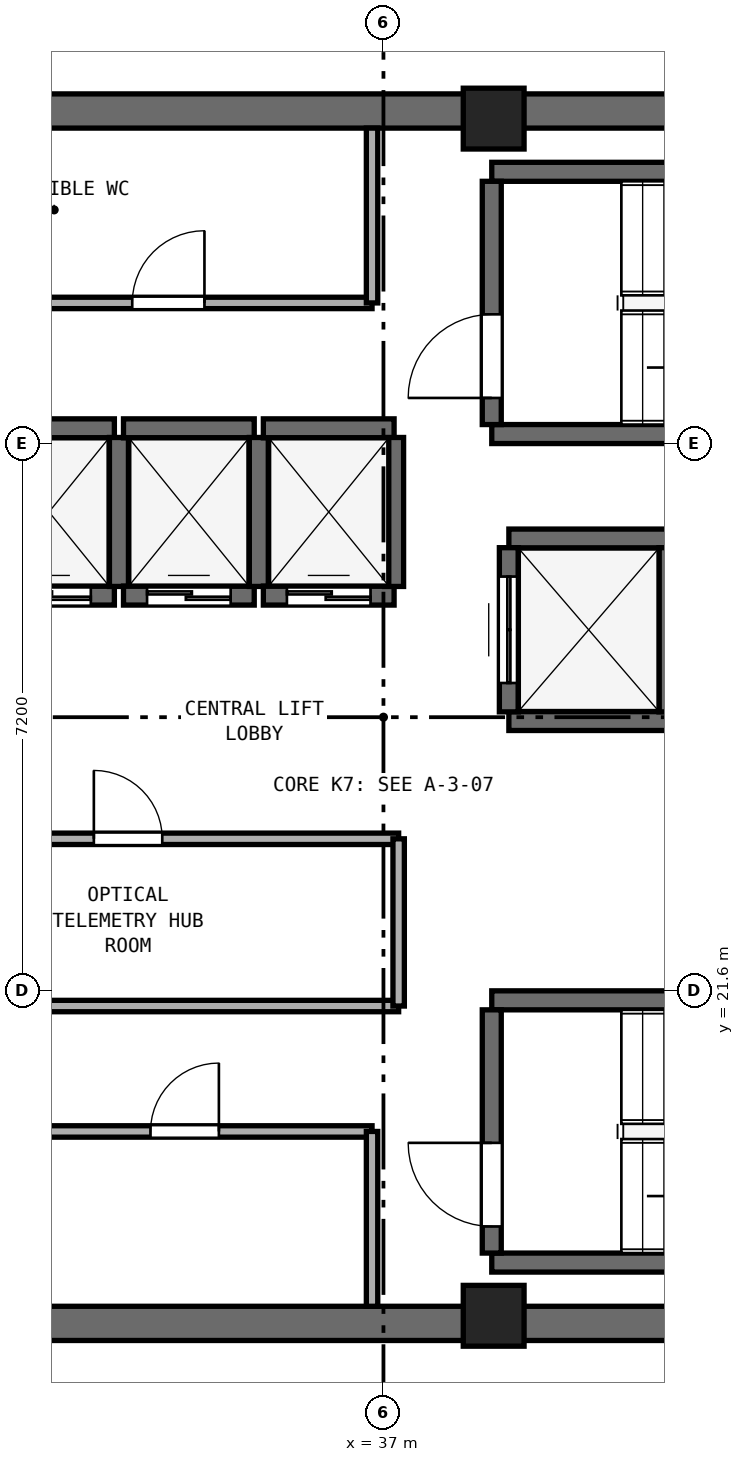
"""IFC4 building model, lengths in metres.
Left out: names, types, materials, properties, quantities, classifications, styles, units other than length and angle.
Written with IfcOpenShell. Run it as: python <this file> out.ifc"""

import sys

from ifc_helpers import new_model, si_unit, direction, frame, frame_2d, origin, origin_2d, place, context, subcontext, project, spatial, rectangle, extrude, element, fill, save


model = new_model("IFC4")
c1 = context("Model", 3, precision=1e-05, world=origin(), true_north=direction((0.0, 1.0)))
c2 = subcontext(c1, "Body", "Model", "MODEL_VIEW")
j1 = project(units=[si_unit("LENGTHUNIT", "METRE"), si_unit("PLANEANGLEUNIT", "RADIAN")], contexts=[c1])
p1 = place(None, origin())
s1 = spatial("IfcSite", under=j1, at=p1, CompositionType="ELEMENT")
p2 = place(p1, origin())
s2 = spatial("IfcBuilding", under=s1, at=p2, CompositionType="ELEMENT")
p3 = place(p2, frame((0.0, 0.0, 274.4)))
s3 = spatial("IfcBuildingStorey", under=s2, at=p3, CompositionType="ELEMENT", Elevation=274.4)
for number, where, z_axis, x_axis in (
    (1, (25.4, 17.225, 0.0), (0.0, 0.0, 1.0), (1.0, 0.0, 0.0)),
    (2, (25.4, 33.175, 0.0), (0.0, 0.0, 1.0), (1.0, 0.0, 0.0)),
):
    element("IfcWall", number, at=place(p3, frame(where, z_axis=z_axis, x_axis=x_axis)), inside=s3, PredefinedType="SHEAR", context=c2, shape_type="SweptSolid", body=[
        extrude(rectangle(XDim=23.2, YDim=0.45, at=frame_2d((11.6, 0.0))), origin(), (0.0, 0.0, 1.0), 3.54),
    ])
for number, where, z_axis, x_axis in (
    (3, (38.45, 17.325, 0.0), (0.0, 0.0, 1.0), (1.0, 0.0, 0.0)),
    (4, (38.45, 33.075, 0.0), (0.0, 0.0, 1.0), (1.0, 0.0, 0.0)),
):
    element("IfcColumn", number, at=place(p3, frame(where, z_axis=z_axis, x_axis=x_axis)), inside=s3, PredefinedType="PILASTER", context=c2, shape_type="SweptSolid", body=[
        extrude(rectangle(XDim=0.8, YDim=0.8, at=origin_2d()), origin(), (0.0, 0.0, 1.0), 3.8),
    ])
for number, where, z_axis, x_axis in (
    (5, (38.425, 28.925, 0.0), (0.0, 0.0, 1.0), (1.0, 0.0, 0.0)),
    (6, (38.425, 32.375, 0.0), (0.0, 0.0, 1.0), (1.0, 0.0, 0.0)),
):
    element("IfcWall", number, at=place(p3, frame(where, z_axis=z_axis, x_axis=x_axis)), inside=s3, PredefinedType="SHEAR", context=c2, shape_type="SweptSolid", body=[
        extrude(rectangle(XDim=7.3, YDim=0.25, at=frame_2d((3.65, 0.0))), origin(), (0.0, 0.0, 1.0), 3.54),
    ])
p4 = place(p3, frame((38.425, 29.05, 0.0), z_axis=(0.0, 0.0, 1.0), x_axis=(0.0, 1.0, 0.0)))
e7 = element("IfcWall", 7, at=p4, inside=s3, PredefinedType="SHEAR", context=c2, shape_type="SweptSolid", body=[
    extrude(rectangle(XDim=3.2, YDim=0.25, at=frame_2d((1.6, 0.0))), origin(), (0.0, 0.0, 1.0), 3.54),
])
p5 = place(p4, frame((0.35, 0.0, 0.0)))
e8 = element("IfcOpeningElement", 8, at=p5, cuts=e7, PredefinedType="OPENING", context=c2, shape_type="SweptSolid", body=[
    extrude(rectangle(XDim=1.1, YDim=2.15, at=frame_2d((0.55, 1.075))), frame((0.0, 0.135, 0.0), z_axis=(0.0, -1.0, 0.0), x_axis=(1.0, 0.0, 0.0)), (0.0, 0.0, 1.0), 0.27),
])
for number, where, z_axis, x_axis in (
    (9, (38.425, 18.025, 0.0), (0.0, 0.0, 1.0), (1.0, 0.0, 0.0)),
    (10, (38.425, 21.475, 0.0), (0.0, 0.0, 1.0), (1.0, 0.0, 0.0)),
):
    element("IfcWall", number, at=place(p3, frame(where, z_axis=z_axis, x_axis=x_axis)), inside=s3, PredefinedType="SHEAR", context=c2, shape_type="SweptSolid", body=[
        extrude(rectangle(XDim=7.3, YDim=0.25, at=frame_2d((3.65, 0.0))), origin(), (0.0, 0.0, 1.0), 3.54),
    ])
p6 = place(p3, frame((38.425, 18.15, 0.0), z_axis=(0.0, 0.0, 1.0), x_axis=(0.0, 1.0, 0.0)))
e11 = element("IfcWall", 11, at=p6, inside=s3, PredefinedType="SHEAR", context=c2, shape_type="SweptSolid", body=[
    extrude(rectangle(XDim=3.2, YDim=0.25, at=frame_2d((1.6, 0.0))), origin(), (0.0, 0.0, 1.0), 3.54),
])
p7 = place(p6, frame((0.35, 0.0, 0.0)))
e12 = element("IfcOpeningElement", 12, at=p7, cuts=e11, PredefinedType="OPENING", context=c2, shape_type="SweptSolid", body=[
    extrude(rectangle(XDim=1.1, YDim=2.15, at=frame_2d((0.55, 1.075))), frame((0.0, 0.135, 0.0), z_axis=(0.0, -1.0, 0.0), x_axis=(1.0, 0.0, 0.0)), (0.0, 0.0, 1.0), 0.27),
])
p8 = place(p3, frame((31.74, 26.8, 0.0), z_axis=(0.0, 0.0, 1.0), x_axis=(1.0, 0.0, 0.0)))
e13 = element("IfcWall", 13, at=p8, inside=s3, PredefinedType="SHEAR", context=c2, shape_type="SweptSolid", body=[
    extrude(rectangle(XDim=1.72, YDim=0.25, at=frame_2d((0.86, 0.0))), origin(), (0.0, 0.0, 1.0), 3.54),
])
p9 = place(p8, frame((0.31, 0.0, 0.0)))
e14 = element("IfcOpeningElement", 14, at=p9, cuts=e13, PredefinedType="OPENING", context=c2, shape_type="SweptSolid", body=[
    extrude(rectangle(XDim=1.1, YDim=2.15, at=frame_2d((0.55, 1.075))), frame((0.0, 0.135, 0.0), z_axis=(0.0, -1.0, 0.0), x_axis=(1.0, 0.0, 0.0)), (0.0, 0.0, 1.0), 0.27),
])
p10 = place(p3, frame((31.74, 29.0, 0.0), z_axis=(0.0, 0.0, 1.0), x_axis=(1.0, 0.0, 0.0)))
e15 = element("IfcWall", 15, at=p10, inside=s3, PredefinedType="SHEAR", context=c2, shape_type="SweptSolid", body=[
    extrude(rectangle(XDim=1.72, YDim=0.25, at=frame_2d((0.86, 0.0))), origin(), (0.0, 0.0, 1.0), 3.54),
])
p11 = place(p3, frame((33.52, 26.92, 0.0), z_axis=(0.0, 0.0, 1.0), x_axis=(0.0, 1.0, 0.0)))
e16 = element("IfcWall", 16, at=p11, inside=s3, PredefinedType="SHEAR", context=c2, shape_type="SweptSolid", body=[
    extrude(rectangle(XDim=1.96, YDim=0.25, at=frame_2d((0.98, 0.0))), origin(), (0.0, 0.0, 1.0), 3.54),
])
p12 = place(p3, frame((33.58, 26.8, 0.0), z_axis=(0.0, 0.0, 1.0), x_axis=(1.0, 0.0, 0.0)))
e17 = element("IfcWall", 17, at=p12, inside=s3, PredefinedType="SHEAR", context=c2, shape_type="SweptSolid", body=[
    extrude(rectangle(XDim=1.72, YDim=0.25, at=frame_2d((0.86, 0.0))), origin(), (0.0, 0.0, 1.0), 3.54),
])
p13 = place(p12, frame((0.31, 0.0, 0.0)))
e18 = element("IfcOpeningElement", 18, at=p13, cuts=e17, PredefinedType="OPENING", context=c2, shape_type="SweptSolid", body=[
    extrude(rectangle(XDim=1.1, YDim=2.15, at=frame_2d((0.55, 1.075))), frame((0.0, 0.135, 0.0), z_axis=(0.0, -1.0, 0.0), x_axis=(1.0, 0.0, 0.0)), (0.0, 0.0, 1.0), 0.27),
])
p14 = place(p3, frame((33.58, 29.0, 0.0), z_axis=(0.0, 0.0, 1.0), x_axis=(1.0, 0.0, 0.0)))
e19 = element("IfcWall", 19, at=p14, inside=s3, PredefinedType="SHEAR", context=c2, shape_type="SweptSolid", body=[
    extrude(rectangle(XDim=1.72, YDim=0.25, at=frame_2d((0.86, 0.0))), origin(), (0.0, 0.0, 1.0), 3.54),
])
p15 = place(p3, frame((35.36, 26.92, 0.0), z_axis=(0.0, 0.0, 1.0), x_axis=(0.0, 1.0, 0.0)))
e20 = element("IfcWall", 20, at=p15, inside=s3, PredefinedType="SHEAR", context=c2, shape_type="SweptSolid", body=[
    extrude(rectangle(XDim=1.96, YDim=0.25, at=frame_2d((0.98, 0.0))), origin(), (0.0, 0.0, 1.0), 3.54),
])
p16 = place(p3, frame((35.42, 26.8, 0.0), z_axis=(0.0, 0.0, 1.0), x_axis=(1.0, 0.0, 0.0)))
e21 = element("IfcWall", 21, at=p16, inside=s3, PredefinedType="SHEAR", context=c2, shape_type="SweptSolid", body=[
    extrude(rectangle(XDim=1.72, YDim=0.25, at=frame_2d((0.86, 0.0))), origin(), (0.0, 0.0, 1.0), 3.54),
])
p17 = place(p16, frame((0.31, 0.0, 0.0)))
e22 = element("IfcOpeningElement", 22, at=p17, cuts=e21, PredefinedType="OPENING", context=c2, shape_type="SweptSolid", body=[
    extrude(rectangle(XDim=1.1, YDim=2.15, at=frame_2d((0.55, 1.075))), frame((0.0, 0.135, 0.0), z_axis=(0.0, -1.0, 0.0), x_axis=(1.0, 0.0, 0.0)), (0.0, 0.0, 1.0), 0.27),
])
p18 = place(p3, frame((35.42, 29.0, 0.0), z_axis=(0.0, 0.0, 1.0), x_axis=(1.0, 0.0, 0.0)))
e23 = element("IfcWall", 23, at=p18, inside=s3, PredefinedType="SHEAR", context=c2, shape_type="SweptSolid", body=[
    extrude(rectangle(XDim=1.72, YDim=0.25, at=frame_2d((0.86, 0.0))), origin(), (0.0, 0.0, 1.0), 3.54),
])
p19 = place(p3, frame((37.14, 26.92, 0.0), z_axis=(0.0, 0.0, 1.0), x_axis=(0.0, 1.0, 0.0)))
e24 = element("IfcWall", 24, at=p19, inside=s3, PredefinedType="SHEAR", context=c2, shape_type="SweptSolid", body=[
    extrude(rectangle(XDim=1.96, YDim=0.25, at=frame_2d((0.98, 0.0))), origin(), (0.0, 0.0, 1.0), 3.54),
])
for number, where, z_axis, x_axis in (
    (25, (38.65, 25.15, 0.0), (0.0, 0.0, 1.0), (1.0, 0.0, 0.0)),
    (26, (38.65, 27.55, 0.0), (0.0, 0.0, 1.0), (1.0, 0.0, 0.0)),
):
    element("IfcWall", number, at=place(p3, frame(where, z_axis=z_axis, x_axis=x_axis)), inside=s3, PredefinedType="SHEAR", context=c2, shape_type="SweptSolid", body=[
        extrude(rectangle(XDim=2.1, YDim=0.25, at=frame_2d((1.05, 0.0))), origin(), (0.0, 0.0, 1.0), 3.54),
    ])
p20 = place(p3, frame((38.65, 25.27, 0.0), z_axis=(0.0, 0.0, 1.0), x_axis=(0.0, 1.0, 0.0)))
e27 = element("IfcWall", 27, at=p20, inside=s3, PredefinedType="SHEAR", context=c2, shape_type="SweptSolid", body=[
    extrude(rectangle(XDim=2.16, YDim=0.25, at=frame_2d((1.08, 0.0))), origin(), (0.0, 0.0, 1.0), 3.54),
])
p21 = place(p20, frame((0.38, 0.0, 0.0)))
e28 = element("IfcOpeningElement", 28, at=p21, cuts=e27, PredefinedType="OPENING", context=c2, shape_type="SweptSolid", body=[
    extrude(rectangle(XDim=1.4, YDim=2.2, at=frame_2d((0.7, 1.1))), frame((0.0, 0.135, 0.0), z_axis=(0.0, -1.0, 0.0), x_axis=(1.0, 0.0, 0.0)), (0.0, 0.0, 1.0), 0.27),
])
p22 = place(p3, frame((40.75, 25.27, 0.0), z_axis=(0.0, 0.0, 1.0), x_axis=(0.0, 1.0, 0.0)))
e29 = element("IfcWall", 29, at=p22, inside=s3, PredefinedType="SHEAR", context=c2, shape_type="SweptSolid", body=[
    extrude(rectangle(XDim=2.16, YDim=0.25, at=frame_2d((1.08, 0.0))), origin(), (0.0, 0.0, 1.0), 3.54),
])
p23 = place(p3, frame((31.49, 30.65, 0.0), z_axis=(0.0, 0.0, 1.0), x_axis=(1.0, 0.0, 0.0)))
e30 = element("IfcWall", 30, at=p23, inside=s3, PredefinedType="PARTITIONING", context=c2, shape_type="SweptSolid", body=[
    extrude(rectangle(XDim=5.36, YDim=0.15, at=frame_2d((2.68, 0.0))), origin(), (0.0, 0.0, 1.0), 3.54),
])
p24 = place(p23, frame((2.205, 0.0, 0.0)))
e31 = element("IfcOpeningElement", 31, at=p24, cuts=e30, PredefinedType="OPENING", context=c2, shape_type="SweptSolid", body=[
    extrude(rectangle(XDim=0.95, YDim=2.1, at=frame_2d((0.475, 1.05))), frame((0.0, 0.085, 0.0), z_axis=(0.0, -1.0, 0.0), x_axis=(1.0, 0.0, 0.0)), (0.0, 0.0, 1.0), 0.17),
])
p25 = place(p3, frame((36.85, 30.65, 0.0), z_axis=(0.0, 0.0, 1.0), x_axis=(0.0, 1.0, 0.0)))
e32 = element("IfcWall", 32, at=p25, inside=s3, PredefinedType="PARTITIONING", context=c2, shape_type="SweptSolid", body=[
    extrude(rectangle(XDim=2.3, YDim=0.15, at=frame_2d((1.15, 0.0))), origin(), (0.0, 0.0, 1.0), 3.54),
])
p26 = place(p3, frame((31.92, 19.75, 0.0), z_axis=(0.0, 0.0, 1.0), x_axis=(1.0, 0.0, 0.0)))
e33 = element("IfcWall", 33, at=p26, inside=s3, PredefinedType="PARTITIONING", context=c2, shape_type="SweptSolid", body=[
    extrude(rectangle(XDim=4.93, YDim=0.15, at=frame_2d((2.465, 0.0))), origin(), (0.0, 0.0, 1.0), 3.54),
])
p27 = place(p26, frame((2.015, 0.0, 0.0)))
e34 = element("IfcOpeningElement", 34, at=p27, cuts=e33, PredefinedType="OPENING", context=c2, shape_type="SweptSolid", body=[
    extrude(rectangle(XDim=0.9, YDim=2.1, at=frame_2d((0.45, 1.05))), frame((0.0, 0.085, 0.0), z_axis=(0.0, -1.0, 0.0), x_axis=(1.0, 0.0, 0.0)), (0.0, 0.0, 1.0), 0.17),
])
p28 = place(p3, frame((36.85, 17.45, 0.0), z_axis=(0.0, 0.0, 1.0), x_axis=(0.0, 1.0, 0.0)))
e35 = element("IfcWall", 35, at=p28, inside=s3, PredefinedType="PARTITIONING", context=c2, shape_type="SweptSolid", body=[
    extrude(rectangle(XDim=2.3, YDim=0.15, at=frame_2d((1.15, 0.0))), origin(), (0.0, 0.0, 1.0), 3.54),
])
p29 = place(p3, frame((30.08, 21.4, 0.0), z_axis=(0.0, 0.0, 1.0), x_axis=(1.0, 0.0, 0.0)))
e36 = element("IfcWall", 36, at=p29, inside=s3, PredefinedType="PARTITIONING", context=c2, shape_type="SweptSolid", body=[
    extrude(rectangle(XDim=7.12, YDim=0.15, at=frame_2d((3.56, 0.0))), origin(), (0.0, 0.0, 1.0), 3.54),
])
p30 = place(p3, frame((30.08, 23.6, 0.0), z_axis=(0.0, 0.0, 1.0), x_axis=(1.0, 0.0, 0.0)))
e37 = element("IfcWall", 37, at=p30, inside=s3, PredefinedType="PARTITIONING", context=c2, shape_type="SweptSolid", body=[
    extrude(rectangle(XDim=7.12, YDim=0.15, at=frame_2d((3.56, 0.0))), origin(), (0.0, 0.0, 1.0), 3.54),
])
p31 = place(p30, frame((3.11, 0.0, 0.0)))
e38 = element("IfcOpeningElement", 38, at=p31, cuts=e37, PredefinedType="OPENING", context=c2, shape_type="SweptSolid", body=[
    extrude(rectangle(XDim=0.9, YDim=2.1, at=frame_2d((0.45, 1.05))), frame((0.0, 0.085, 0.0), z_axis=(0.0, -1.0, 0.0), x_axis=(1.0, 0.0, 0.0)), (0.0, 0.0, 1.0), 0.17),
])
p32 = place(p3, frame((37.2, 21.4, 0.0), z_axis=(0.0, 0.0, 1.0), x_axis=(0.0, 1.0, 0.0)))
e39 = element("IfcWall", 39, at=p32, inside=s3, PredefinedType="PARTITIONING", context=c2, shape_type="SweptSolid", body=[
    extrude(rectangle(XDim=2.2, YDim=0.15, at=frame_2d((1.1, 0.0))), origin(), (0.0, 0.0, 1.0), 3.54),
])
p33 = place(p5, origin())
e40 = element("IfcDoor", 40, at=p33, inside=s3, OperationType="SINGLE_SWING_LEFT", PredefinedType="DOOR", context=c2, shape_type="SweptSolid", body=[
    extrude(rectangle(XDim=1.1, YDim=2.15, at=frame_2d((0.55, 1.075))), frame((0.0, 0.025, 0.0), z_axis=(0.0, -1.0, 0.0), x_axis=(1.0, 0.0, 0.0)), (0.0, 0.0, 1.0), 0.05),
])
fill(e8, e40)
p34 = place(p7, origin())
e41 = element("IfcDoor", 41, at=p34, inside=s3, OperationType="SINGLE_SWING_RIGHT", PredefinedType="DOOR", context=c2, shape_type="SweptSolid", body=[
    extrude(rectangle(XDim=1.1, YDim=2.15, at=frame_2d((0.55, 1.075))), frame((0.0, 0.025, 0.0), z_axis=(0.0, -1.0, 0.0), x_axis=(1.0, 0.0, 0.0)), (0.0, 0.0, 1.0), 0.05),
])
fill(e12, e41)
p35 = place(p9, origin())
e42 = element("IfcDoor", 42, at=p35, inside=s3, OperationType="DOUBLE_DOOR_SLIDING", PredefinedType="DOOR", context=c2, shape_type="SweptSolid", body=[
    extrude(rectangle(XDim=1.1, YDim=2.15, at=frame_2d((0.55, 1.075))), frame((0.0, 0.025, 0.0), z_axis=(0.0, -1.0, 0.0), x_axis=(1.0, 0.0, 0.0)), (0.0, 0.0, 1.0), 0.05),
])
fill(e14, e42)
p36 = place(p13, origin())
e43 = element("IfcDoor", 43, at=p36, inside=s3, OperationType="DOUBLE_DOOR_SLIDING", PredefinedType="DOOR", context=c2, shape_type="SweptSolid", body=[
    extrude(rectangle(XDim=1.1, YDim=2.15, at=frame_2d((0.55, 1.075))), frame((0.0, 0.025, 0.0), z_axis=(0.0, -1.0, 0.0), x_axis=(1.0, 0.0, 0.0)), (0.0, 0.0, 1.0), 0.05),
])
fill(e18, e43)
p37 = place(p17, origin())
e44 = element("IfcDoor", 44, at=p37, inside=s3, OperationType="DOUBLE_DOOR_SLIDING", PredefinedType="DOOR", context=c2, shape_type="SweptSolid", body=[
    extrude(rectangle(XDim=1.1, YDim=2.15, at=frame_2d((0.55, 1.075))), frame((0.0, 0.025, 0.0), z_axis=(0.0, -1.0, 0.0), x_axis=(1.0, 0.0, 0.0)), (0.0, 0.0, 1.0), 0.05),
])
fill(e22, e44)
p38 = place(p21, origin())
e45 = element("IfcDoor", 45, at=p38, inside=s3, OperationType="DOUBLE_DOOR_SLIDING", PredefinedType="DOOR", context=c2, shape_type="SweptSolid", body=[
    extrude(rectangle(XDim=1.4, YDim=2.2, at=frame_2d((0.7, 1.1))), frame((0.0, 0.025, 0.0), z_axis=(0.0, -1.0, 0.0), x_axis=(1.0, 0.0, 0.0)), (0.0, 0.0, 1.0), 0.05),
])
fill(e28, e45)
p39 = place(p24, origin())
e46 = element("IfcDoor", 46, at=p39, inside=s3, OperationType="SINGLE_SWING_RIGHT", PredefinedType="DOOR", context=c2, shape_type="SweptSolid", body=[
    extrude(rectangle(XDim=0.95, YDim=2.1, at=frame_2d((0.475, 1.05))), frame((0.0, 0.025, 0.0), z_axis=(0.0, -1.0, 0.0), x_axis=(1.0, 0.0, 0.0)), (0.0, 0.0, 1.0), 0.05),
])
fill(e31, e46)
p40 = place(p27, origin())
e47 = element("IfcDoor", 47, at=p40, inside=s3, OperationType="SINGLE_SWING_RIGHT", PredefinedType="DOOR", context=c2, shape_type="SweptSolid", body=[
    extrude(rectangle(XDim=0.9, YDim=2.1, at=frame_2d((0.45, 1.05))), frame((0.0, 0.025, 0.0), z_axis=(0.0, -1.0, 0.0), x_axis=(1.0, 0.0, 0.0)), (0.0, 0.0, 1.0), 0.05),
])
fill(e34, e47)
p41 = place(p31, origin())
e48 = element("IfcDoor", 48, at=p41, inside=s3, OperationType="SINGLE_SWING_LEFT", PredefinedType="DOOR", context=c2, shape_type="SweptSolid", body=[
    extrude(rectangle(XDim=0.9, YDim=2.1, at=frame_2d((0.45, 1.05))), frame((0.0, 0.025, 0.0), z_axis=(0.0, -1.0, 0.0), x_axis=(1.0, 0.0, 0.0)), (0.0, 0.0, 1.0), 0.05),
])
fill(e38, e48)
save(model, sys.argv[1])
